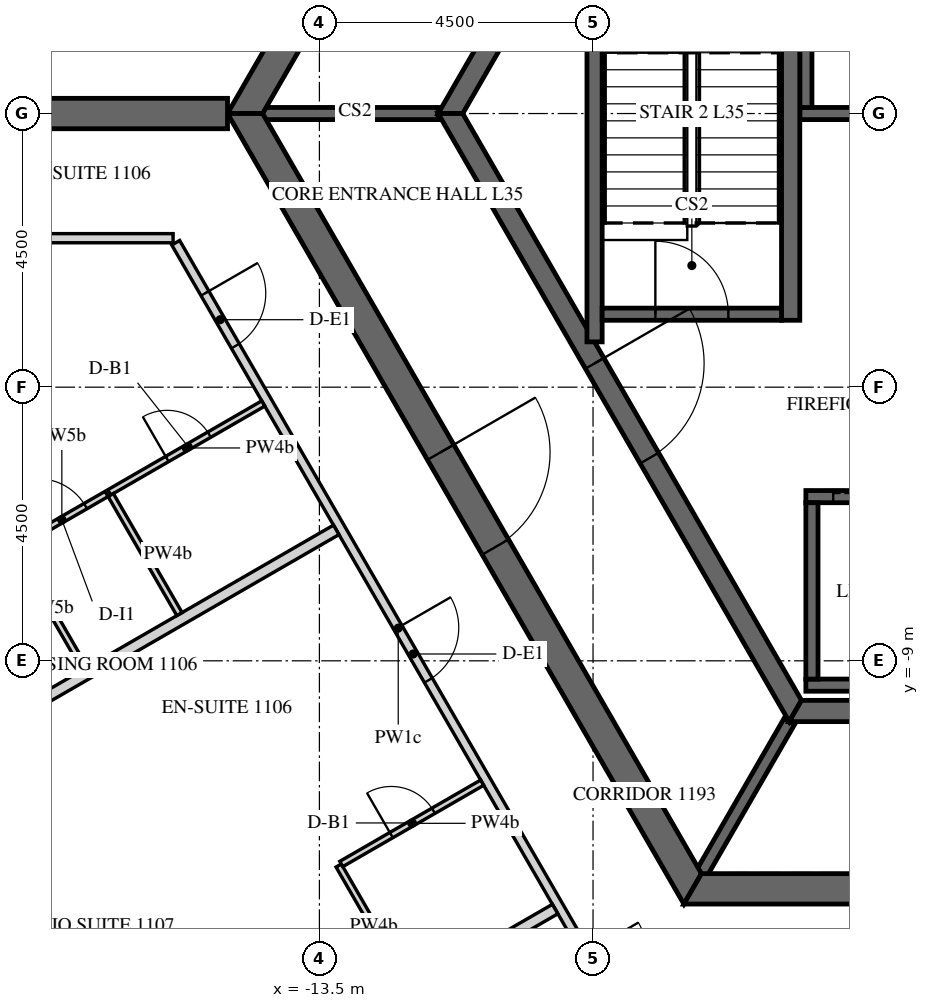
"""IFC4 building model, lengths in metres.
Left out: names, types, materials, properties, quantities, classifications, styles, units other than length and angle.
Written with IfcOpenShell. Run it as: python <this file> out.ifc"""

import sys

from ifc_helpers import new_model, si_unit, direction, frame, frame_2d, origin, place, context, subcontext, project, spatial, polyline, rectangle, outline, extrude, element, fill, save


model = new_model("IFC4")
c1 = context("Model", 3, precision=1e-05, world=origin(), true_north=direction((0.0, 1.0)))
c2 = subcontext(c1, "Body", "Model", "MODEL_VIEW")
j1 = project(units=[si_unit("LENGTHUNIT", "METRE"), si_unit("PLANEANGLEUNIT", "RADIAN")], contexts=[c1])
p1 = place(None, origin())
s1 = spatial("IfcSite", under=j1, at=p1, CompositionType="ELEMENT")
p2 = place(p1, origin())
s2 = spatial("IfcBuilding", under=s1, at=p2, CompositionType="ELEMENT")
p3 = place(p2, frame((0.0, 0.0, 152.7)))
s3 = spatial("IfcBuildingStorey", under=s2, at=p3, CompositionType="ELEMENT", Elevation=152.7)
p4 = place(p3, frame((-30.391, -2.811, 0.0), z_axis=(0.0, 0.0, 1.0), x_axis=(0.499998569178, -0.866026229868, 0.0)))
e1 = element("IfcWall", 1, at=p4, inside=s3, PredefinedType="SOLIDWALL", context=c2, shape_type="SweptSolid", body=[
    extrude(outline(polyline([(-0.022, -0.275), (27.783, -0.275), (27.732, 0.275), (0.022, 0.275), (-0.022, -0.275)])), origin(), (0.0, 0.0, 1.0), 3.75),
])
p5 = place(p4, frame((1.879, 0.0, 0.9)))
e2 = element("IfcOpeningElement", 2, at=p5, cuts=e1, PredefinedType="OPENING", context=c2, shape_type="SweptSolid", body=[
    extrude(rectangle(XDim=2.4, YDim=2.4, at=frame_2d((1.2, 1.2))), frame((0.0, 0.285, 0.0), z_axis=(0.0, -1.0, 0.0), x_axis=(1.0, 0.0, 0.0)), (0.0, 0.0, 1.0), 0.57),
])
p6 = place(p4, frame((5.479, 0.0, 0.9)))
e3 = element("IfcOpeningElement", 3, at=p6, cuts=e1, PredefinedType="OPENING", context=c2, shape_type="SweptSolid", body=[
    extrude(rectangle(XDim=2.4, YDim=2.4, at=frame_2d((1.2, 1.2))), frame((0.0, 0.285, 0.0), z_axis=(0.0, -1.0, 0.0), x_axis=(1.0, 0.0, 0.0)), (0.0, 0.0, 1.0), 0.57),
])
p7 = place(p4, frame((9.079, 0.0, 0.9)))
e4 = element("IfcOpeningElement", 4, at=p7, cuts=e1, PredefinedType="OPENING", context=c2, shape_type="SweptSolid", body=[
    extrude(rectangle(XDim=2.4, YDim=2.4, at=frame_2d((1.2, 1.2))), frame((0.0, 0.285, 0.0), z_axis=(0.0, -1.0, 0.0), x_axis=(1.0, 0.0, 0.0)), (0.0, 0.0, 1.0), 0.57),
])
p8 = place(p4, frame((12.679, 0.0, 0.9)))
e5 = element("IfcOpeningElement", 5, at=p8, cuts=e1, PredefinedType="OPENING", context=c2, shape_type="SweptSolid", body=[
    extrude(rectangle(XDim=2.4, YDim=2.4, at=frame_2d((1.2, 1.2))), frame((0.0, 0.285, 0.0), z_axis=(0.0, -1.0, 0.0), x_axis=(1.0, 0.0, 0.0)), (0.0, 0.0, 1.0), 0.57),
])
p9 = place(p4, frame((16.279, 0.0, 0.9)))
e6 = element("IfcOpeningElement", 6, at=p9, cuts=e1, PredefinedType="OPENING", context=c2, shape_type="SweptSolid", body=[
    extrude(rectangle(XDim=2.4, YDim=2.4, at=frame_2d((1.2, 1.2))), frame((0.0, 0.285, 0.0), z_axis=(0.0, -1.0, 0.0), x_axis=(1.0, 0.0, 0.0)), (0.0, 0.0, 1.0), 0.57),
])
p10 = place(p4, frame((19.879, 0.0, 0.9)))
e7 = element("IfcOpeningElement", 7, at=p10, cuts=e1, PredefinedType="OPENING", context=c2, shape_type="SweptSolid", body=[
    extrude(rectangle(XDim=2.4, YDim=2.4, at=frame_2d((1.2, 1.2))), frame((0.0, 0.285, 0.0), z_axis=(0.0, -1.0, 0.0), x_axis=(1.0, 0.0, 0.0)), (0.0, 0.0, 1.0), 0.57),
])
p11 = place(p4, frame((23.479, 0.0, 0.9)))
e8 = element("IfcOpeningElement", 8, at=p11, cuts=e1, PredefinedType="OPENING", context=c2, shape_type="SweptSolid", body=[
    extrude(rectangle(XDim=2.4, YDim=2.4, at=frame_2d((1.2, 1.2))), frame((0.0, 0.285, 0.0), z_axis=(0.0, -1.0, 0.0), x_axis=(1.0, 0.0, 0.0)), (0.0, 0.0, 1.0), 0.57),
])
p12 = place(p3, frame((-7.361, 12.75, 0.0), z_axis=(0.0, 0.0, 1.0), x_axis=(-0.50000571537, -0.866022103989, 0.0)))
e9 = element("IfcWall", 9, at=p12, inside=s3, PredefinedType="SHEAR", context=c2, shape_type="SweptSolid", body=[
    extrude(outline(polyline([(-0.144, -0.25), (14.867, -0.25), (14.578, 0.25), (0.144, 0.25), (-0.144, -0.25)])), origin(), (0.0, 0.0, 1.0), 3.75),
])
p13 = place(p12, frame((6.49, 0.0, 0.0)))
e10 = element("IfcOpeningElement", 10, at=p13, cuts=e9, PredefinedType="OPENING", context=c2, shape_type="SweptSolid", body=[
    extrude(rectangle(XDim=1.8, YDim=2.4, at=frame_2d((0.9, 1.2))), frame((0.0, 0.26, 0.0), z_axis=(0.0, -1.0, 0.0), x_axis=(1.0, 0.0, 0.0)), (0.0, 0.0, 1.0), 0.52),
])
p14 = place(p3, frame((-14.722, 0.0, 0.0), z_axis=(0.0, 0.0, 1.0), x_axis=(0.50000571537, -0.866022103989, 0.0)))
e11 = element("IfcWall", 11, at=p14, inside=s3, PredefinedType="SHEAR", context=c2, shape_type="SweptSolid", body=[
    extrude(outline(polyline([(-0.144, -0.25), (14.867, -0.25), (14.578, 0.25), (0.144, 0.25), (-0.144, -0.25)])), origin(), (0.0, 0.0, 1.0), 3.75),
])
p15 = place(p14, frame((6.432, 0.0, 0.0)))
e12 = element("IfcOpeningElement", 12, at=p15, cuts=e11, PredefinedType="OPENING", context=c2, shape_type="SweptSolid", body=[
    extrude(rectangle(XDim=1.8, YDim=2.4, at=frame_2d((0.9, 1.2))), frame((0.0, 0.26, 0.0), z_axis=(0.0, -1.0, 0.0), x_axis=(1.0, 0.0, 0.0)), (0.0, 0.0, 1.0), 0.52),
])
p16 = place(p3, frame((-7.361, -12.75, 0.0), z_axis=(0.0, 0.0, 1.0), x_axis=(1.0, 0.0, 0.0)))
e13 = element("IfcWall", 13, at=p16, inside=s3, PredefinedType="SHEAR", context=c2, shape_type="SweptSolid", body=[
    extrude(outline(polyline([(-0.144, -0.25), (14.866, -0.25), (14.578, 0.25), (0.144, 0.25), (-0.144, -0.25)])), origin(), (0.0, 0.0, 1.0), 3.75),
])
p17 = place(p16, frame((6.761, 0.0, 0.0)))
e14 = element("IfcOpeningElement", 14, at=p17, cuts=e13, PredefinedType="OPENING", context=c2, shape_type="SweptSolid", body=[
    extrude(rectangle(XDim=1.2, YDim=2.4, at=frame_2d((0.6, 1.2))), frame((0.0, 0.26, 0.0), z_axis=(0.0, -1.0, 0.0), x_axis=(1.0, 0.0, 0.0)), (0.0, 0.0, 1.0), 0.52),
])
p18 = place(p3, frame((-15.011, 0.0, 0.0), z_axis=(0.0, 0.0, 1.0), x_axis=(-1.0, 0.0, 0.0)))
e15 = element("IfcWall", 15, at=p18, inside=s3, PredefinedType="SHEAR", context=c2, shape_type="SweptSolid", body=[
    extrude(rectangle(XDim=15.424, YDim=0.5, at=frame_2d((7.712, 0.0))), origin(), (0.0, 0.0, 1.0), 3.75),
])
p19 = place(p18, frame((6.812, 0.0, 0.0)))
e16 = element("IfcOpeningElement", 16, at=p19, cuts=e15, PredefinedType="OPENING", context=c2, shape_type="SweptSolid", body=[
    extrude(rectangle(XDim=1.8, YDim=2.4, at=frame_2d((0.9, 1.2))), frame((0.0, 0.26, 0.0), z_axis=(0.0, -1.0, 0.0), x_axis=(1.0, 0.0, 0.0)), (0.0, 0.0, 1.0), 0.52),
])
p20 = place(p3, frame((-5.673, 9.825, 0.0), z_axis=(0.0, 0.0, 1.0), x_axis=(-0.499995046907, -0.866028263435, 0.0)))
e17 = element("IfcWall", 17, at=p20, inside=s3, PredefinedType="SHEAR", context=c2, shape_type="SweptSolid", body=[
    extrude(outline(polyline([(-0.101, -0.175), (11.446, -0.175), (11.244, 0.175), (0.101, 0.175), (-0.101, -0.175)])), origin(), (0.0, 0.0, 1.0), 3.75),
])
p21 = place(p20, frame((4.801, 0.0, 0.0)))
e18 = element("IfcOpeningElement", 18, at=p21, cuts=e17, PredefinedType="OPENING", context=c2, shape_type="SweptSolid", body=[
    extrude(rectangle(XDim=1.8, YDim=2.4, at=frame_2d((0.9, 1.2))), frame((0.0, 0.185, 0.0), z_axis=(0.0, -1.0, 0.0), x_axis=(1.0, 0.0, 0.0)), (0.0, 0.0, 1.0), 0.37),
])
p22 = place(p3, frame((-11.345, 0.0, 0.0), z_axis=(0.0, 0.0, 1.0), x_axis=(0.499995046907, -0.866028263435, 0.0)))
e19 = element("IfcWall", 19, at=p22, inside=s3, PredefinedType="SHEAR", context=c2, shape_type="SweptSolid", body=[
    extrude(outline(polyline([(-0.101, -0.175), (11.446, -0.175), (11.244, 0.175), (0.101, 0.175), (-0.101, -0.175)])), origin(), (0.0, 0.0, 1.0), 3.75),
])
p23 = place(p22, frame((4.744, 0.0, 0.0)))
e20 = element("IfcOpeningElement", 20, at=p23, cuts=e19, PredefinedType="OPENING", context=c2, shape_type="SweptSolid", body=[
    extrude(rectangle(XDim=1.8, YDim=2.4, at=frame_2d((0.9, 1.2))), frame((0.0, 0.185, 0.0), z_axis=(0.0, -1.0, 0.0), x_axis=(1.0, 0.0, 0.0)), (0.0, 0.0, 1.0), 0.37),
])
p24 = place(p3, frame((-5.673, -9.825, 0.0), z_axis=(0.0, 0.0, 1.0), x_axis=(1.0, 0.0, 0.0)))
e21 = element("IfcWall", 21, at=p24, inside=s3, PredefinedType="SHEAR", context=c2, shape_type="SweptSolid", body=[
    extrude(outline(polyline([(-0.101, -0.175), (11.446, -0.175), (11.244, 0.175), (0.101, 0.175), (-0.101, -0.175)])), origin(), (0.0, 0.0, 1.0), 3.75),
])
p25 = place(p3, frame((-5.6, 0.0, -0.5), z_axis=(0.0, 0.0, 1.0), x_axis=(1.0, 0.0, 0.0)))
e22 = element("IfcWall", 22, at=p25, inside=s3, PredefinedType="SHEAR", context=c2, shape_type="SweptSolid", body=[
    extrude(rectangle(XDim=11.2, YDim=0.2, at=frame_2d((5.6, 0.0))), origin(), (0.0, 0.0, 1.0), 4.15),
])
p26 = place(p3, frame((-5.5, 0.1, -0.5), z_axis=(0.0, 0.0, 1.0), x_axis=(0.0, 1.0, 0.0)))
e23 = element("IfcWall", 23, at=p26, inside=s3, PredefinedType="SHEAR", context=c2, shape_type="SweptSolid", body=[
    extrude(rectangle(XDim=3.1, YDim=0.2, at=frame_2d((1.55, 0.0))), origin(), (0.0, 0.0, 1.0), 4.15),
])
p27 = place(p3, frame((-5.5, -6.3, -0.5), z_axis=(0.0, 0.0, 1.0), x_axis=(1.0, 0.0, 0.0)))
e24 = element("IfcWall", 24, at=p27, inside=s3, PredefinedType="SHEAR", context=c2, shape_type="SweptSolid", body=[
    extrude(rectangle(XDim=9.2, YDim=0.2, at=frame_2d((4.6, 0.0))), origin(), (0.0, 0.0, 1.0), 4.15),
])
p28 = place(p27, frame((0.45, 0.0, 0.5)))
e25 = element("IfcOpeningElement", 25, at=p28, cuts=e24, PredefinedType="OPENING", context=c2, shape_type="SweptSolid", body=[
    extrude(rectangle(XDim=1.1, YDim=2.1, at=frame_2d((0.55, 1.05))), frame((0.0, 0.11, 0.0), z_axis=(0.0, -1.0, 0.0), x_axis=(1.0, 0.0, 0.0)), (0.0, 0.0, 1.0), 0.22),
])
p29 = place(p27, frame((2.25, 0.0, 0.5)))
e26 = element("IfcOpeningElement", 26, at=p29, cuts=e24, PredefinedType="OPENING", context=c2, shape_type="SweptSolid", body=[
    extrude(rectangle(XDim=1.1, YDim=2.1, at=frame_2d((0.55, 1.05))), frame((0.0, 0.11, 0.0), z_axis=(0.0, -1.0, 0.0), x_axis=(1.0, 0.0, 0.0)), (0.0, 0.0, 1.0), 0.22),
])
p30 = place(p27, frame((4.05, 0.0, 0.5)))
e27 = element("IfcOpeningElement", 27, at=p30, cuts=e24, PredefinedType="OPENING", context=c2, shape_type="SweptSolid", body=[
    extrude(rectangle(XDim=1.1, YDim=2.1, at=frame_2d((0.55, 1.05))), frame((0.0, 0.11, 0.0), z_axis=(0.0, -1.0, 0.0), x_axis=(1.0, 0.0, 0.0)), (0.0, 0.0, 1.0), 0.22),
])
p31 = place(p27, frame((5.85, 0.0, 0.5)))
e28 = element("IfcOpeningElement", 28, at=p31, cuts=e24, PredefinedType="OPENING", context=c2, shape_type="SweptSolid", body=[
    extrude(rectangle(XDim=1.1, YDim=2.1, at=frame_2d((0.55, 1.05))), frame((0.0, 0.11, 0.0), z_axis=(0.0, -1.0, 0.0), x_axis=(1.0, 0.0, 0.0)), (0.0, 0.0, 1.0), 0.22),
])
p32 = place(p27, frame((7.65, 0.0, 0.5)))
e29 = element("IfcOpeningElement", 29, at=p32, cuts=e24, PredefinedType="OPENING", context=c2, shape_type="SweptSolid", body=[
    extrude(rectangle(XDim=1.1, YDim=2.1, at=frame_2d((0.55, 1.05))), frame((0.0, 0.11, 0.0), z_axis=(0.0, -1.0, 0.0), x_axis=(1.0, 0.0, 0.0)), (0.0, 0.0, 1.0), 0.22),
])
p33 = place(p3, frame((-5.5, -9.4, -0.5), z_axis=(0.0, 0.0, 1.0), x_axis=(1.0, 0.0, 0.0)))
e30 = element("IfcWall", 30, at=p33, inside=s3, PredefinedType="SHEAR", context=c2, shape_type="SweptSolid", body=[
    extrude(rectangle(XDim=9.2, YDim=0.2, at=frame_2d((4.6, 0.0))), origin(), (0.0, 0.0, 1.0), 4.15),
])
p34 = place(p3, frame((-5.4, -9.3, -0.5), z_axis=(0.0, 0.0, 1.0), x_axis=(0.0, 1.0, 0.0)))
e31 = element("IfcWall", 31, at=p34, inside=s3, PredefinedType="SHEAR", context=c2, shape_type="SweptSolid", body=[
    extrude(rectangle(XDim=2.9, YDim=0.2, at=frame_2d((1.45, 0.0))), origin(), (0.0, 0.0, 1.0), 4.15),
])
for number, where, z_axis, x_axis in (
    (32, (-11.547, 0.0, 0.0), (0.0, 0.0, 1.0), (-1.0, 0.0, 0.0)),
    (33, (-5.773, -10.0, 0.0), (0.0, 0.0, 1.0), (-0.5, -0.866, 0.0)),
):
    element("IfcWall", number, at=place(p3, frame(where, z_axis=z_axis, x_axis=x_axis)), inside=s3, PredefinedType="SHEAR", context=c2, shape_type="SweptSolid", body=[
        extrude(rectangle(XDim=2.887, YDim=0.2, at=frame_2d((1.443, 0.0))), origin(), (0.0, 0.0, 1.0), 3.75),
    ])
p35 = place(p3, frame((-5.75, -3.4, -0.5), z_axis=(0.0, 0.0, 1.0), x_axis=(0.0, 1.0, 0.0)))
e34 = element("IfcWall", 34, at=p35, inside=s3, PredefinedType="SHEAR", context=c2, shape_type="SweptSolid", body=[
    extrude(rectangle(XDim=6.8, YDim=0.3, at=frame_2d((3.4, 0.0))), origin(), (0.0, 0.0, 1.0), 4.15),
])
p36 = place(p3, frame((-8.975, -3.755, -0.5), z_axis=(0.0, 0.0, 1.0), x_axis=(0.0, 1.0, 0.0)))
e35 = element("IfcWall", 35, at=p36, inside=s3, PredefinedType="SHEAR", context=c2, shape_type="SweptSolid", body=[
    extrude(rectangle(XDim=7.51, YDim=0.25, at=frame_2d((3.755, 0.0))), origin(), (0.0, 0.0, 1.0), 4.15),
])
p37 = place(p3, frame((-8.85, -3.3, -0.5), z_axis=(0.0, 0.0, 1.0), x_axis=(1.0, 0.0, 0.0)))
e36 = element("IfcWall", 36, at=p37, inside=s3, PredefinedType="SHEAR", context=c2, shape_type="SweptSolid", body=[
    extrude(rectangle(XDim=2.95, YDim=0.2, at=frame_2d((1.475, 0.0))), origin(), (0.0, 0.0, 1.0), 4.15),
])
p38 = place(p37, frame((0.875, 0.0, 0.5)))
e37 = element("IfcOpeningElement", 37, at=p38, cuts=e36, PredefinedType="OPENING", context=c2, shape_type="SweptSolid", body=[
    extrude(rectangle(XDim=1.2, YDim=2.4, at=frame_2d((0.6, 1.2))), frame((0.0, 0.11, 0.0), z_axis=(0.0, -1.0, 0.0), x_axis=(1.0, 0.0, 0.0)), (0.0, 0.0, 1.0), 0.22),
])
p39 = place(p3, frame((-23.848, -2.05, 0.0), z_axis=(0.0, 0.0, 1.0), x_axis=(1.0, 0.0, 0.0)))
e38 = element("IfcWall", 38, at=p39, inside=s3, PredefinedType="PARTITIONING", context=c2, shape_type="SweptSolid", body=[
    extrude(rectangle(XDim=7.942, YDim=0.15, at=frame_2d((3.971, 0.0))), origin(), (0.0, 0.0, 1.0), 2.823),
])
p40 = place(p3, frame((-15.863, -2.125, 0.0), z_axis=(0.0, 0.0, 1.0), x_axis=(0.500008833422, -0.866020303746, 0.0)))
e39 = element("IfcWall", 39, at=p40, inside=s3, PredefinedType="PARTITIONING", context=c2, shape_type="SweptSolid", body=[
    extrude(rectangle(XDim=14.636, YDim=0.15, at=frame_2d((7.318, 0.0))), origin(), (0.0, 0.0, 1.0), 2.823),
])
p41 = place(p40, frame((0.961, 0.0, 0.0)))
e40 = element("IfcOpeningElement", 40, at=p41, cuts=e39, PredefinedType="OPENING", context=c2, shape_type="SweptSolid", body=[
    extrude(rectangle(XDim=1.0, YDim=2.1, at=frame_2d((0.5, 1.05))), frame((0.0, 0.085, 0.0), z_axis=(0.0, -1.0, 0.0), x_axis=(1.0, 0.0, 0.0)), (0.0, 0.0, 1.0), 0.17),
])
p42 = place(p40, frame((7.309, 0.0, 0.0)))
e41 = element("IfcOpeningElement", 41, at=p42, cuts=e39, PredefinedType="OPENING", context=c2, shape_type="SweptSolid", body=[
    extrude(rectangle(XDim=1.0, YDim=2.1, at=frame_2d((0.5, 1.05))), frame((0.0, 0.085, 0.0), z_axis=(0.0, -1.0, 0.0), x_axis=(1.0, 0.0, 0.0)), (0.0, 0.0, 1.0), 0.17),
])
p43 = place(p40, frame((13.486, 0.0, 0.0)))
e42 = element("IfcOpeningElement", 42, at=p43, cuts=e39, PredefinedType="OPENING", context=c2, shape_type="SweptSolid", body=[
    extrude(rectangle(XDim=1.0, YDim=2.1, at=frame_2d((0.5, 1.05))), frame((0.0, 0.085, 0.0), z_axis=(0.0, -1.0, 0.0), x_axis=(1.0, 0.0, 0.0)), (0.0, 0.0, 1.0), 0.17),
])
p44 = place(p3, frame((-16.956, -6.231, 0.0), z_axis=(0.0, 0.0, 1.0), x_axis=(0.866046596414, 0.499963291492, 0.0)))
e43 = element("IfcWall", 43, at=p44, inside=s3, PredefinedType="PARTITIONING", context=c2, shape_type="SweptSolid", body=[
    extrude(rectangle(XDim=2.925, YDim=0.1, at=frame_2d((1.462, 0.0))), origin(), (0.0, 0.0, 1.0), 2.823),
])
p45 = place(p44, frame((1.1, 0.0, 0.0)))
e44 = element("IfcOpeningElement", 44, at=p45, cuts=e43, PredefinedType="OPENING", context=c2, shape_type="SweptSolid", body=[
    extrude(rectangle(XDim=0.8, YDim=2.1, at=frame_2d((0.4, 1.05))), frame((0.0, 0.06, 0.0), z_axis=(0.0, -1.0, 0.0), x_axis=(1.0, 0.0, 0.0)), (0.0, 0.0, 1.0), 0.12),
])
p46 = place(p3, frame((-17.36, -9.131, 0.0), z_axis=(0.0, 0.0, 1.0), x_axis=(-0.500015210774, 0.866016621662, 0.0)))
e45 = element("IfcWall", 45, at=p46, inside=s3, PredefinedType="PARTITIONING", context=c2, shape_type="SweptSolid", body=[
    extrude(rectangle(XDim=2.31, YDim=0.1, at=frame_2d((1.155, 0.0))), origin(), (0.0, 0.0, 1.0), 2.823),
])
p47 = place(p3, frame((-18.472, -7.106, 0.0), z_axis=(0.0, 0.0, 1.0), x_axis=(0.866087547558, 0.499892348375, 0.0)))
e46 = element("IfcWall", 46, at=p47, inside=s3, PredefinedType="PARTITIONING", context=c2, shape_type="SweptSolid", body=[
    extrude(rectangle(XDim=1.7, YDim=0.1, at=frame_2d((0.85, 0.0))), origin(), (0.0, 0.0, 1.0), 2.823),
])
p48 = place(p47, frame((0.4, 0.0, 0.0)))
e47 = element("IfcOpeningElement", 47, at=p48, cuts=e46, PredefinedType="OPENING", context=c2, shape_type="SweptSolid", body=[
    extrude(rectangle(XDim=0.9, YDim=2.1, at=frame_2d((0.45, 1.05))), frame((0.0, 0.06, 0.0), z_axis=(0.0, -1.0, 0.0), x_axis=(1.0, 0.0, 0.0)), (0.0, 0.0, 1.0), 0.12),
])
p49 = place(p3, frame((-24.114, -13.134, 0.0), z_axis=(0.0, 0.0, 1.0), x_axis=(0.866024255907, 0.500001988177, 0.0)))
e48 = element("IfcWall", 48, at=p49, inside=s3, PredefinedType="PARTITIONING", context=c2, shape_type="SweptSolid", body=[
    extrude(rectangle(XDim=12.575, YDim=0.18, at=frame_2d((6.288, 0.0))), origin(), (0.0, 0.0, 1.0), 2.823),
])
p50 = place(p3, frame((-16.931, -6.274, 0.0), z_axis=(0.0, 0.0, 1.0), x_axis=(0.500077800282, -0.865980481111, 0.0)))
e49 = element("IfcWall", 49, at=p50, inside=s3, PredefinedType="PARTITIONING", context=c2, shape_type="SweptSolid", body=[
    extrude(rectangle(XDim=2.26, YDim=0.1, at=frame_2d((1.13, 0.0))), origin(), (0.0, 0.0, 1.0), 2.823),
])
p51 = place(p3, frame((-12.028, -14.367, 0.0), z_axis=(0.0, 0.0, 1.0), x_axis=(-0.500015210774, 0.866016621662, 0.0)))
e50 = element("IfcWall", 50, at=p51, inside=s3, PredefinedType="PARTITIONING", context=c2, shape_type="SweptSolid", body=[
    extrude(rectangle(XDim=2.31, YDim=0.1, at=frame_2d((1.155, 0.0))), origin(), (0.0, 0.0, 1.0), 2.823),
])
p52 = place(p3, frame((-13.14, -12.341, 0.0), z_axis=(0.0, 0.0, 1.0), x_axis=(0.86604424267, 0.499967368674, 0.0)))
e51 = element("IfcWall", 51, at=p52, inside=s3, PredefinedType="PARTITIONING", context=c2, shape_type="SweptSolid", body=[
    extrude(rectangle(XDim=2.675, YDim=0.1, at=frame_2d((1.337, 0.0))), origin(), (0.0, 0.0, 1.0), 2.823),
])
p53 = place(p52, frame((0.95, 0.0, 0.0)))
e52 = element("IfcOpeningElement", 52, at=p53, cuts=e51, PredefinedType="OPENING", context=c2, shape_type="SweptSolid", body=[
    extrude(rectangle(XDim=0.8, YDim=2.1, at=frame_2d((0.4, 1.05))), frame((0.0, 0.06, 0.0), z_axis=(0.0, -1.0, 0.0), x_axis=(1.0, 0.0, 0.0)), (0.0, 0.0, 1.0), 0.12),
])
p54 = place(p3, frame((-20.513, -19.37, 0.0), z_axis=(0.0, 0.0, 1.0), x_axis=(0.866019402111, 0.500010395058, 0.0)))
e53 = element("IfcWall", 53, at=p54, inside=s3, PredefinedType="PARTITIONING", context=c2, shape_type="SweptSolid", body=[
    extrude(rectangle(XDim=12.575, YDim=0.18, at=frame_2d((6.288, 0.0))), origin(), (0.0, 0.0, 1.0), 2.823),
])
p55 = place(p15, origin())
e54 = element("IfcDoor", 54, at=p55, inside=s3, OperationType="DOUBLE_DOOR_SINGLE_SWING", PredefinedType="DOOR", context=c2, shape_type="SweptSolid", body=[
    extrude(rectangle(XDim=1.8, YDim=2.4, at=frame_2d((0.9, 1.2))), frame((0.0, 0.025, 0.0), z_axis=(0.0, -1.0, 0.0), x_axis=(1.0, 0.0, 0.0)), (0.0, 0.0, 1.0), 0.05),
])
fill(e12, e54)
p56 = place(p23, origin())
e55 = element("IfcDoor", 55, at=p56, inside=s3, OperationType="DOUBLE_DOOR_SINGLE_SWING", PredefinedType="DOOR", context=c2, shape_type="SweptSolid", body=[
    extrude(rectangle(XDim=1.8, YDim=2.4, at=frame_2d((0.9, 1.2))), frame((0.0, 0.025, 0.0), z_axis=(0.0, -1.0, 0.0), x_axis=(1.0, 0.0, 0.0)), (0.0, 0.0, 1.0), 0.05),
])
fill(e20, e55)
p57 = place(p38, origin())
e56 = element("IfcDoor", 56, at=p57, inside=s3, OperationType="SINGLE_SWING_LEFT", PredefinedType="DOOR", context=c2, shape_type="SweptSolid", body=[
    extrude(rectangle(XDim=1.2, YDim=2.4, at=frame_2d((0.6, 1.2))), frame((0.0, 0.025, 0.0), z_axis=(0.0, -1.0, 0.0), x_axis=(1.0, 0.0, 0.0)), (0.0, 0.0, 1.0), 0.05),
])
fill(e37, e56)
p58 = place(p28, origin())
e57 = element("IfcDoor", 57, at=p58, inside=s3, OperationType="SLIDING_TO_LEFT", PredefinedType="DOOR", context=c2, shape_type="SweptSolid", body=[
    extrude(rectangle(XDim=1.1, YDim=2.1, at=frame_2d((0.55, 1.05))), frame((0.0, 0.025, 0.0), z_axis=(0.0, -1.0, 0.0), x_axis=(1.0, 0.0, 0.0)), (0.0, 0.0, 1.0), 0.05),
])
fill(e25, e57)
p59 = place(p41, origin())
e58 = element("IfcDoor", 58, at=p59, inside=s3, OperationType="SINGLE_SWING_RIGHT", PredefinedType="DOOR", context=c2, shape_type="SweptSolid", body=[
    extrude(rectangle(XDim=1.0, YDim=2.1, at=frame_2d((0.5, 1.05))), frame((0.0, 0.025, 0.0), z_axis=(0.0, -1.0, 0.0), x_axis=(1.0, 0.0, 0.0)), (0.0, 0.0, 1.0), 0.05),
])
fill(e40, e58)
p60 = place(p45, origin())
e59 = element("IfcDoor", 59, at=p60, inside=s3, OperationType="SINGLE_SWING_LEFT", PredefinedType="DOOR", context=c2, shape_type="SweptSolid", body=[
    extrude(rectangle(XDim=0.8, YDim=2.1, at=frame_2d((0.4, 1.05))), frame((0.0, 0.025, 0.0), z_axis=(0.0, -1.0, 0.0), x_axis=(1.0, 0.0, 0.0)), (0.0, 0.0, 1.0), 0.05),
])
fill(e44, e59)
p61 = place(p48, origin())
e60 = element("IfcDoor", 60, at=p61, inside=s3, OperationType="SINGLE_SWING_RIGHT", PredefinedType="DOOR", context=c2, shape_type="SweptSolid", body=[
    extrude(rectangle(XDim=0.9, YDim=2.1, at=frame_2d((0.45, 1.05))), frame((0.0, 0.025, 0.0), z_axis=(0.0, -1.0, 0.0), x_axis=(1.0, 0.0, 0.0)), (0.0, 0.0, 1.0), 0.05),
])
fill(e47, e60)
p62 = place(p42, origin())
e61 = element("IfcDoor", 61, at=p62, inside=s3, OperationType="SINGLE_SWING_LEFT", PredefinedType="DOOR", context=c2, shape_type="SweptSolid", body=[
    extrude(rectangle(XDim=1.0, YDim=2.1, at=frame_2d((0.5, 1.05))), frame((0.0, 0.025, 0.0), z_axis=(0.0, -1.0, 0.0), x_axis=(1.0, 0.0, 0.0)), (0.0, 0.0, 1.0), 0.05),
])
fill(e41, e61)
p63 = place(p53, origin())
e62 = element("IfcDoor", 62, at=p63, inside=s3, OperationType="SINGLE_SWING_RIGHT", PredefinedType="DOOR", context=c2, shape_type="SweptSolid", body=[
    extrude(rectangle(XDim=0.8, YDim=2.1, at=frame_2d((0.4, 1.05))), frame((0.0, 0.025, 0.0), z_axis=(0.0, -1.0, 0.0), x_axis=(1.0, 0.0, 0.0)), (0.0, 0.0, 1.0), 0.05),
])
fill(e52, e62)
save(model, sys.argv[1])
